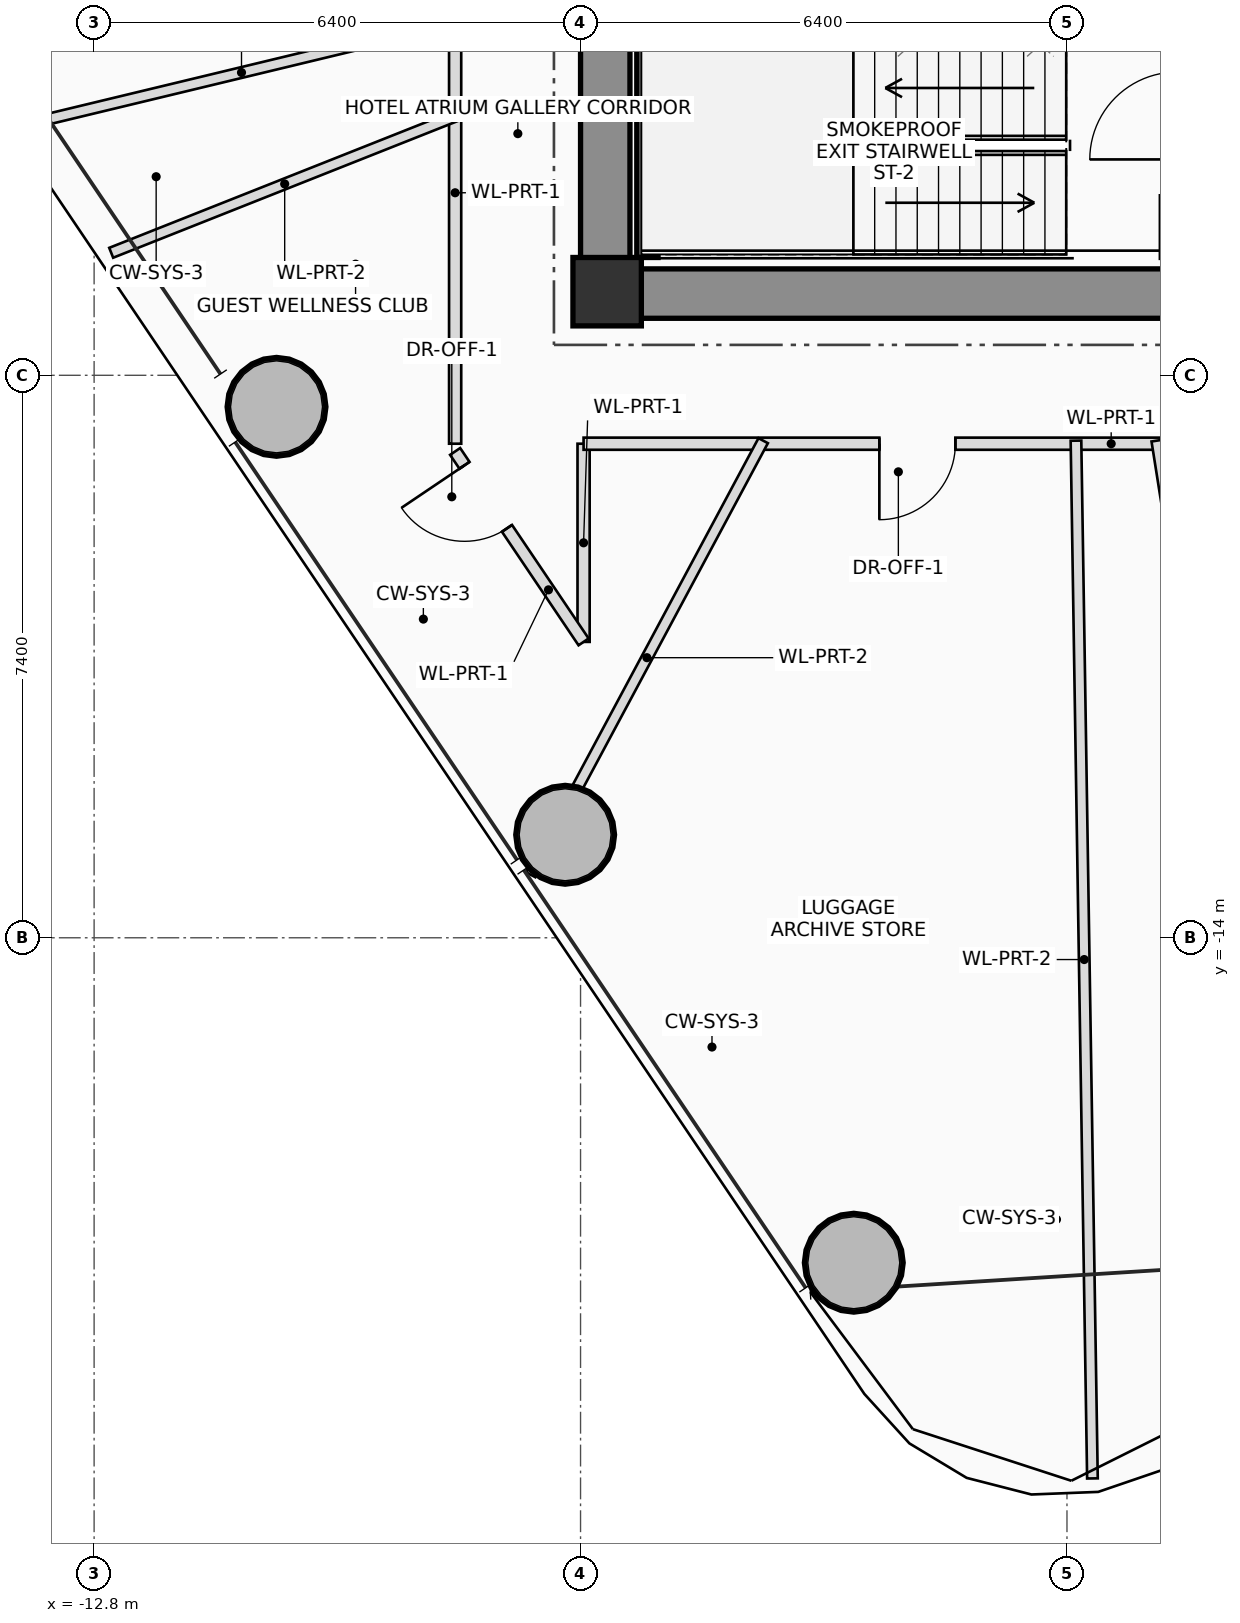
"""IFC4 building model, lengths in metres.
Left out: names, types, materials, properties, quantities, classifications, styles, units other than length and angle.
Written with IfcOpenShell. Run it as: python <this file> out.ifc"""

import sys

from ifc_helpers import new_model, si_unit, direction, frame, frame_2d, origin, origin_2d, place, context, subcontext, project, spatial, rectangle, hollow_circle, extrude, source, transform, mapped, element, fill, save


model = new_model("IFC4")
c1 = context("Model", 3, precision=1e-05, world=origin(), true_north=direction((0.0, 1.0)))
c2 = subcontext(c1, "Body", "Model", "MODEL_VIEW")
j1 = project(units=[si_unit("LENGTHUNIT", "METRE"), si_unit("PLANEANGLEUNIT", "RADIAN")], contexts=[c1])
p1 = place(None, origin())
s1 = spatial("IfcSite", under=j1, at=p1, CompositionType="ELEMENT")
p2 = place(p1, origin())
s2 = spatial("IfcBuilding", under=s1, at=p2, CompositionType="ELEMENT")
p3 = place(p2, frame((0.0, 0.0, 158.75)))
s3 = spatial("IfcBuildingStorey", under=s2, at=p3, CompositionType="ELEMENT", Elevation=158.75)
m1 = source(origin(), c2, "Body", "SweptSolid", [
    extrude(rectangle(XDim=0.9, YDim=0.9, at=origin_2d()), origin(), (0.0, 0.0, 1.0), 3.45),
])
p4 = place(p3, frame((-6.05, -5.5, 0.0), z_axis=(0.0, 0.0, 1.0), x_axis=(1.0, 0.0, 0.0)))
e1 = element("IfcColumn", 1, at=p4, inside=s3, PredefinedType="COLUMN", context=c2, shape_type="MappedRepresentation", body=[
    mapped(m1, transform((0.0, 0.0, 0.0), scale=1.0)),
])
p5 = place(p3, frame((-6.4, -5.525, 0.0), z_axis=(0.0, 0.0, 1.0), x_axis=(1.0, 0.0, 0.0)))
e2 = element("IfcWall", 2, at=p5, inside=s3, PredefinedType="SHEAR", context=c2, shape_type="SweptSolid", body=[
    extrude(rectangle(XDim=12.8, YDim=0.65, at=frame_2d((6.4, 0.0))), origin(), (0.0, 0.0, 1.0), 3.45),
])
p6 = place(p5, frame((8.6, 0.0, 0.0)))
e3 = element("IfcOpeningElement", 3, at=p6, cuts=e2, PredefinedType="OPENING", context=c2, shape_type="SweptSolid", body=[
    extrude(rectangle(XDim=1.2, YDim=2.2, at=frame_2d((0.6, 1.1))), frame((0.0, 0.335, 0.0), z_axis=(0.0, -1.0, 0.0), x_axis=(1.0, 0.0, 0.0)), (0.0, 0.0, 1.0), 0.67),
])
p7 = place(p3, frame((-6.075, -5.2, 0.0), z_axis=(0.0, 0.0, 1.0), x_axis=(0.0, 1.0, 0.0)))
e4 = element("IfcWall", 4, at=p7, inside=s3, PredefinedType="SHEAR", context=c2, shape_type="SweptSolid", body=[
    extrude(rectangle(XDim=3.45, YDim=0.65, at=frame_2d((1.725, 0.0))), origin(), (0.0, 0.0, 1.0), 3.45),
])
p8 = place(p3, frame((-5.52, -5.05, 0.0), z_axis=(0.0, 0.0, 1.0), x_axis=(0.0, 1.0, 0.0)))
e5 = element("IfcWall", 5, at=p8, inside=s3, PredefinedType="SHEAR", context=c2, shape_type="SweptSolid", body=[
    extrude(rectangle(XDim=2.75, YDim=0.28, at=frame_2d((1.375, 0.0))), origin(), (0.0, 0.0, 1.0), 3.45),
])
m2 = source(origin(), c2, "Body", "SweptSolid", [
    extrude(hollow_circle(Radius=0.65, WallThickness=0.045, at=origin_2d()), origin(), (0.0, 0.0, 1.0), 3.45),
])
for number, where, z_axis, x_axis in (
    (6, (-10.4, -7.015, 0.0), (0.0, 0.0, 1.0), (1.0, 0.0, 0.0)),
    (7, (-6.603, -12.645, 0.0), (0.0, 0.0, 1.0), (1.0, 0.0, 0.0)),
    (8, (-2.805, -18.275, 0.0), (0.0, 0.0, 1.0), (1.0, 0.0, 0.0)),
):
    element("IfcColumn", number, at=place(p3, frame(where, z_axis=z_axis, x_axis=x_axis)), inside=s3, PredefinedType="COLUMN", context=c2, shape_type="MappedRepresentation", body=[
        mapped(m2, transform((0.0, 0.0, 0.0), scale=1.0)),
    ])
p9 = place(p3, frame((-6.36, -7.5, 0.0), z_axis=(0.0, 0.0, 1.0), x_axis=(0.0, -1.0, 0.0)))
e9 = element("IfcWall", 9, at=p9, inside=s3, PredefinedType="PARTITIONING", context=c2, shape_type="SweptSolid", body=[
    extrude(rectangle(XDim=2.607, YDim=0.16, at=frame_2d((1.304, 0.0))), origin(), (0.0, 0.0, 1.0), 2.605),
])
p10 = place(p3, frame((-6.36, -10.107, 0.0), z_axis=(0.0, 0.0, 1.0), x_axis=(-0.559166202639, 0.829055581868, 0.0)))
e10 = element("IfcWall", 10, at=p10, inside=s3, PredefinedType="PARTITIONING", context=c2, shape_type="SweptSolid", body=[
    extrude(rectangle(XDim=3.022, YDim=0.16, at=frame_2d((1.511, 0.0))), origin(), (0.0, 0.0, 1.0), 2.605),
])
p11 = place(p10, frame((1.802, 0.0, 0.0)))
e11 = element("IfcOpeningElement", 11, at=p11, cuts=e10, PredefinedType="OPENING", context=c2, shape_type="SweptSolid", body=[
    extrude(rectangle(XDim=1.0, YDim=2.25, at=frame_2d((0.5, 1.125))), frame((0.0, 0.09, 0.0), z_axis=(0.0, -1.0, 0.0), x_axis=(1.0, 0.0, 0.0)), (0.0, 0.0, 1.0), 0.18),
])
p12 = place(p3, frame((-8.05, -7.5, 0.0), z_axis=(0.0, 0.0, 1.0), x_axis=(0.0, 1.0, 0.0)))
e12 = element("IfcWall", 12, at=p12, inside=s3, PredefinedType="PARTITIONING", context=c2, shape_type="SweptSolid", body=[
    extrude(rectangle(XDim=15.0, YDim=0.16, at=frame_2d((7.5, 0.0))), origin(), (0.0, 0.0, 1.0), 2.605),
])
p13 = place(p12, frame((6.753, 0.0, 0.0)))
e13 = element("IfcOpeningElement", 13, at=p13, cuts=e12, PredefinedType="OPENING", context=c2, shape_type="SweptSolid", body=[
    extrude(rectangle(XDim=1.05, YDim=2.2, at=frame_2d((0.525, 1.1))), frame((0.0, 0.09, 0.0), z_axis=(0.0, -1.0, 0.0), x_axis=(1.0, 0.0, 0.0)), (0.0, 0.0, 1.0), 0.18),
])
p14 = place(p12, frame((10.436, 0.0, 0.0)))
e14 = element("IfcOpeningElement", 14, at=p14, cuts=e12, PredefinedType="OPENING", context=c2, shape_type="SweptSolid", body=[
    extrude(rectangle(XDim=1.05, YDim=2.2, at=frame_2d((0.525, 1.1))), frame((0.0, 0.09, 0.0), z_axis=(0.0, -1.0, 0.0), x_axis=(1.0, 0.0, 0.0)), (0.0, 0.0, 1.0), 0.18),
])
p15 = place(p12, frame((13.78, 0.0, 0.0)))
e15 = element("IfcOpeningElement", 15, at=p15, cuts=e12, PredefinedType="OPENING", context=c2, shape_type="SweptSolid", body=[
    extrude(rectangle(XDim=1.0, YDim=2.25, at=frame_2d((0.5, 1.125))), frame((0.0, 0.09, 0.0), z_axis=(0.0, -1.0, 0.0), x_axis=(1.0, 0.0, 0.0)), (0.0, 0.0, 1.0), 0.18),
])
p16 = place(p3, frame((5.25, -7.5, 0.0), z_axis=(0.0, 0.0, 1.0), x_axis=(-1.0, 0.0, 0.0)))
e16 = element("IfcWall", 16, at=p16, inside=s3, PredefinedType="PARTITIONING", context=c2, shape_type="SweptSolid", body=[
    extrude(rectangle(XDim=11.61, YDim=0.16, at=frame_2d((5.805, 0.0))), origin(), (0.0, 0.0, 1.0), 2.605),
])
p17 = place(p16, frame((1.618, 0.0, 0.0)))
e17 = element("IfcOpeningElement", 17, at=p17, cuts=e16, PredefinedType="OPENING", context=c2, shape_type="SweptSolid", body=[
    extrude(rectangle(XDim=1.0, YDim=2.25, at=frame_2d((0.5, 1.125))), frame((0.0, 0.09, 0.0), z_axis=(0.0, -1.0, 0.0), x_axis=(1.0, 0.0, 0.0)), (0.0, 0.0, 1.0), 0.18),
])
p18 = place(p16, frame((6.719, 0.0, 0.0)))
e18 = element("IfcOpeningElement", 18, at=p18, cuts=e16, PredefinedType="OPENING", context=c2, shape_type="SweptSolid", body=[
    extrude(rectangle(XDim=1.0, YDim=2.25, at=frame_2d((0.5, 1.125))), frame((0.0, 0.09, 0.0), z_axis=(0.0, -1.0, 0.0), x_axis=(1.0, 0.0, 0.0)), (0.0, 0.0, 1.0), 0.18),
])
p19 = place(p3, frame((-8.01, -1.93, 0.0), z_axis=(0.0, 0.0, 1.0), x_axis=(-0.972178712373, -0.23424037058, 0.0)))
e19 = element("IfcWall", 19, at=p19, inside=s3, PredefinedType="PARTITIONING", context=c2, shape_type="SweptSolid", body=[
    extrude(rectangle(XDim=5.865, YDim=0.14, at=frame_2d((2.932, 0.0))), origin(), (0.0, 0.0, 1.0), 2.605),
])
p20 = place(p3, frame((-8.01, -3.177, 0.0), z_axis=(0.0, 0.0, 1.0), x_axis=(-0.929545887112, -0.368706446586, 0.0)))
e20 = element("IfcWall", 20, at=p20, inside=s3, PredefinedType="PARTITIONING", context=c2, shape_type="SweptSolid", body=[
    extrude(rectangle(XDim=4.911, YDim=0.14, at=frame_2d((2.456, 0.0))), origin(), (0.0, 0.0, 1.0), 2.605),
])
p21 = place(p3, frame((-3.997, -7.46, 0.0), z_axis=(0.0, 0.0, 1.0), x_axis=(-0.472255924341, -0.881461480681, 0.0)))
e21 = element("IfcWall", 21, at=p21, inside=s3, PredefinedType="PARTITIONING", context=c2, shape_type="SweptSolid", body=[
    extrude(rectangle(XDim=6.478, YDim=0.14, at=frame_2d((3.239, 0.0))), origin(), (0.0, 0.0, 1.0), 2.605),
])
p22 = place(p3, frame((0.118, -7.46, 0.0), z_axis=(0.0, 0.0, 1.0), x_axis=(0.015859383496, -0.999874232069, 0.0)))
e22 = element("IfcWall", 22, at=p22, inside=s3, PredefinedType="PARTITIONING", context=c2, shape_type="SweptSolid", body=[
    extrude(rectangle(XDim=13.655, YDim=0.14, at=frame_2d((6.827, 0.0))), origin(), (0.0, 0.0, 1.0), 2.765),
])
p23 = place(p3, frame((1.181, -7.46, 0.0), z_axis=(0.0, 0.0, 1.0), x_axis=(0.156458885844, -0.98768447241, 0.0)))
e23 = element("IfcWall", 23, at=p23, inside=s3, PredefinedType="PARTITIONING", context=c2, shape_type="SweptSolid", body=[
    extrude(rectangle(XDim=11.316, YDim=0.14, at=frame_2d((5.658, 0.0))), origin(), (0.0, 0.0, 1.0), 2.605),
])
p24 = place(p11, origin())
e24 = element("IfcDoor", 24, at=p24, inside=s3, OperationType="SINGLE_SWING_RIGHT", PredefinedType="DOOR", context=c2, shape_type="SweptSolid", body=[
    extrude(rectangle(XDim=1.0, YDim=2.25, at=frame_2d((0.5, 1.125))), frame((0.0, 0.025, 0.0), z_axis=(0.0, -1.0, 0.0), x_axis=(1.0, 0.0, 0.0)), (0.0, 0.0, 1.0), 0.05),
])
fill(e11, e24)
p25 = place(p18, origin())
e25 = element("IfcDoor", 25, at=p25, inside=s3, OperationType="SINGLE_SWING_RIGHT", PredefinedType="DOOR", context=c2, shape_type="SweptSolid", body=[
    extrude(rectangle(XDim=1.0, YDim=2.25, at=frame_2d((0.5, 1.125))), frame((0.0, 0.025, 0.0), z_axis=(0.0, -1.0, 0.0), x_axis=(1.0, 0.0, 0.0)), (0.0, 0.0, 1.0), 0.05),
])
fill(e18, e25)
save(model, sys.argv[1])
